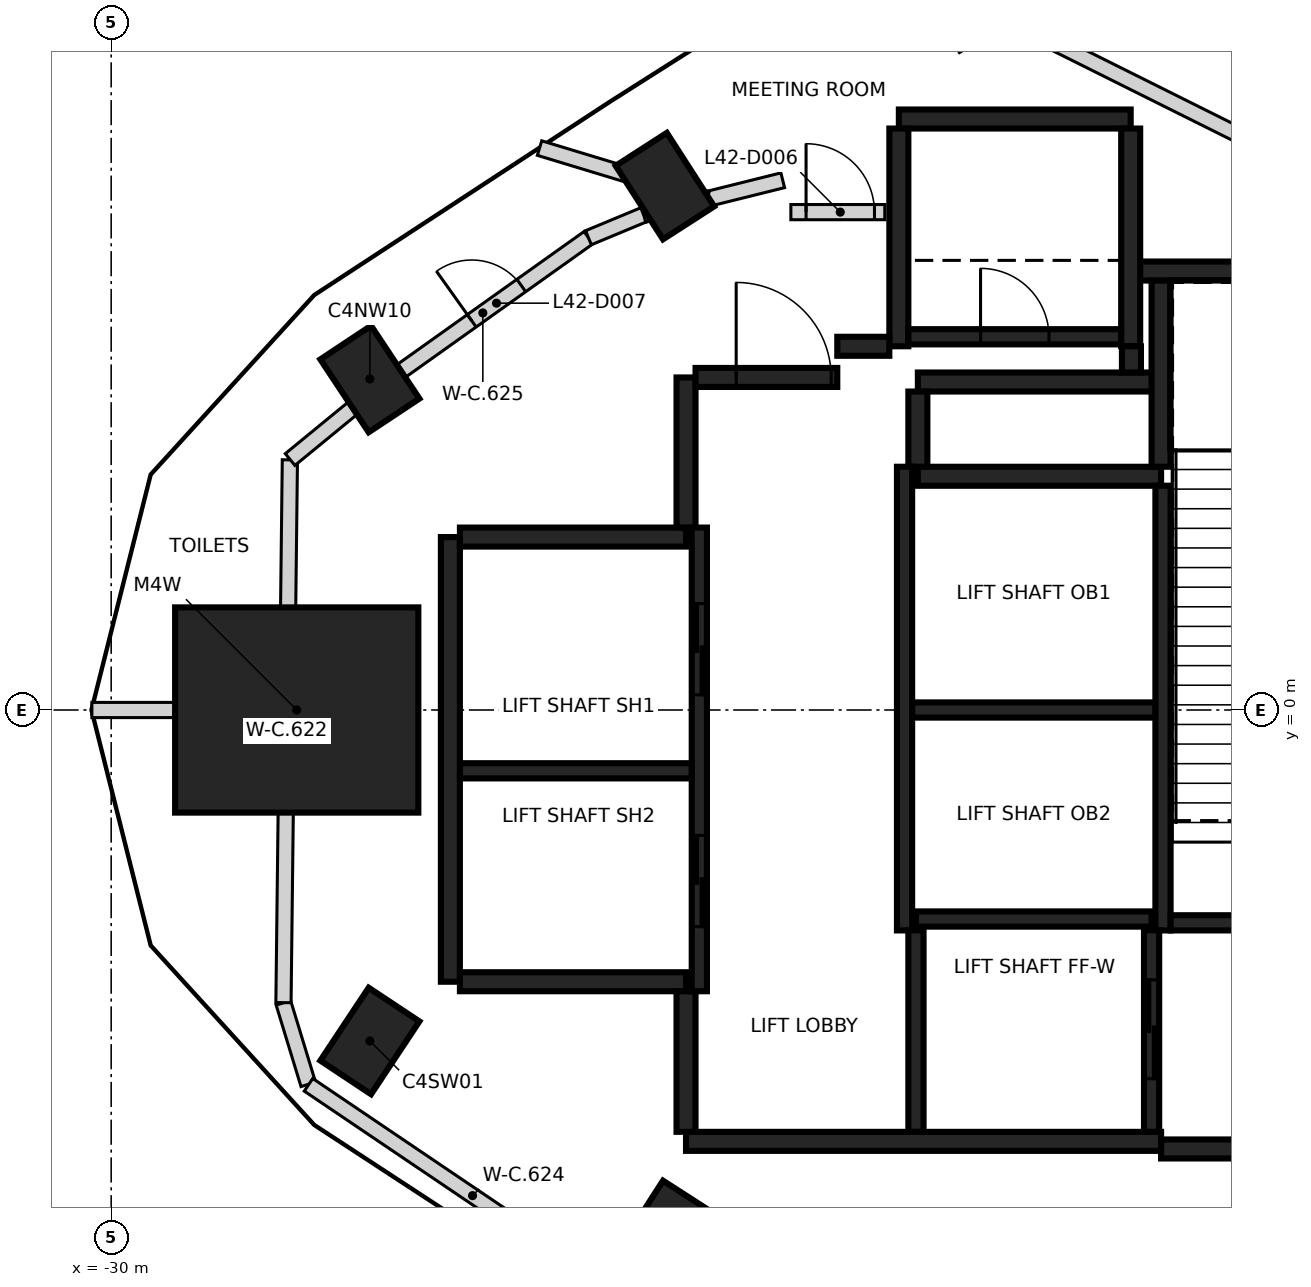
"""IFC4 building model, lengths in metres.
Left out: names, types, materials, properties, quantities, classifications, styles, units other than length and angle.
Written with IfcOpenShell. Run it as: python <this file> out.ifc"""

import sys

from ifc_helpers import new_model, si_unit, direction, frame, frame_2d, origin, origin_2d, place, context, subcontext, project, spatial, rectangle, extrude, element, fill, save


model = new_model("IFC4")
c1 = context("Model", 3, precision=1e-05, world=origin(), true_north=direction((0.0, 1.0)))
c2 = subcontext(c1, "Body", "Model", "MODEL_VIEW")
j1 = project(units=[si_unit("LENGTHUNIT", "METRE"), si_unit("PLANEANGLEUNIT", "RADIAN")], contexts=[c1])
p1 = place(None, origin())
s1 = spatial("IfcSite", under=j1, at=p1, CompositionType="ELEMENT")
p2 = place(p1, origin())
s2 = spatial("IfcBuilding", under=s1, at=p2, CompositionType="ELEMENT")
p3 = place(p2, frame((0.0, 0.0, 169.6)))
s3 = spatial("IfcBuildingStorey", under=s2, at=p3, CompositionType="ELEMENT", Elevation=169.6)
for number, where, z_axis, x_axis in (
    (1, (-22.715, 6.892, -0.35), (0.0, 0.0, 1.0), (-0.541, 0.841, 0.0)),
    (2, (-26.597, 4.354, -0.35), (0.0, 0.0, 1.0), (-0.553, 0.833, 0.0)),
    (3, (-26.597, -4.354, -0.35), (0.0, 0.0, 1.0), (0.553, 0.833, 0.0)),
    (4, (-22.715, -6.892, -0.35), (0.0, 0.0, 1.0), (0.541, 0.841, 0.0)),
):
    element("IfcColumn", number, at=place(p3, frame(where, z_axis=z_axis, x_axis=x_axis)), inside=s3, PredefinedType="COLUMN", context=c2, shape_type="SweptSolid", body=[
        extrude(rectangle(XDim=1.15, YDim=0.8, at=origin_2d()), origin(), (0.0, 0.0, 1.0), 6.0),
    ])
p4 = place(p3, frame((-27.559, 0.0, -0.35), z_axis=(0.0, 0.0, 1.0), x_axis=(1.0, 0.0, 0.0)))
e5 = element("IfcColumn", 5, at=p4, inside=s3, PredefinedType="COLUMN", context=c2, shape_type="SweptSolid", body=[
    extrude(rectangle(XDim=3.2, YDim=2.7, at=origin_2d()), origin(), (0.0, 0.0, 1.0), 6.0),
])
p5 = place(p3, frame((-16.187, -5.675, 0.0), z_axis=(0.0, 0.0, 1.0), x_axis=(-1.0, 0.0, 0.0)))
e6 = element("IfcWall", 6, at=p5, inside=s3, PredefinedType="SHEAR", context=c2, shape_type="SweptSolid", body=[
    extrude(rectangle(XDim=6.25, YDim=0.25, at=frame_2d((3.125, 0.0))), origin(), (0.0, 0.0, 1.0), 5.65),
])
p6 = place(p3, frame((-25.537, -3.575, 0.0), z_axis=(0.0, 0.0, 1.0), x_axis=(0.0, 1.0, 0.0)))
e7 = element("IfcWall", 7, at=p6, inside=s3, PredefinedType="SHEAR", context=c2, shape_type="SweptSolid", body=[
    extrude(rectangle(XDim=5.85, YDim=0.25, at=frame_2d((2.925, 0.0))), origin(), (0.0, 0.0, 1.0), 5.65),
])
p7 = place(p3, frame((-10.963, -5.775, 0.0), z_axis=(0.0, 0.0, 1.0), x_axis=(-1.0, 0.0, 0.0)))
e8 = element("IfcWall", 8, at=p7, inside=s3, PredefinedType="SHEAR", context=c2, shape_type="SweptSolid", body=[
    extrude(rectangle(XDim=5.225, YDim=0.25, at=frame_2d((2.612, 0.0))), origin(), (0.0, 0.0, 1.0), 5.65),
])
p8 = place(p3, frame((-16.472, 5.775, 0.0), z_axis=(0.0, 0.0, 1.0), x_axis=(1.0, 0.0, 0.0)))
e9 = element("IfcWall", 9, at=p8, inside=s3, PredefinedType="SHEAR", context=c2, shape_type="SweptSolid", body=[
    extrude(rectangle(XDim=5.51, YDim=0.25, at=frame_2d((2.755, 0.0))), origin(), (0.0, 0.0, 1.0), 5.65),
])
p9 = place(p3, frame((-19.387, 3.075, 0.0), z_axis=(0.0, 0.0, 1.0), x_axis=(1.0, 0.0, 0.0)))
e10 = element("IfcWall", 10, at=p9, inside=s3, PredefinedType="SHEAR", context=c2, shape_type="SweptSolid", body=[
    extrude(rectangle(XDim=3.2, YDim=0.25, at=frame_2d((1.6, 0.0))), origin(), (0.0, 0.0, 1.0), 5.65),
])
for number, where, z_axis, x_axis in (
    (11, (-22.437, -3.575, 0.0), (0.0, 0.0, 1.0), (-1.0, 0.0, 0.0)),
    (12, (-25.412, 2.275, 0.0), (0.0, 0.0, 1.0), (1.0, 0.0, 0.0)),
):
    element("IfcWall", number, at=place(p3, frame(where, z_axis=z_axis, x_axis=x_axis)), inside=s3, PredefinedType="SHEAR", context=c2, shape_type="SweptSolid", body=[
        extrude(rectangle(XDim=2.975, YDim=0.25, at=frame_2d((1.487, 0.0))), origin(), (0.0, 0.0, 1.0), 5.65),
    ])
p10 = place(p3, frame((-19.637, 7.775, 0.0), z_axis=(0.0, 0.0, 1.0), x_axis=(1.0, 0.0, 0.0)))
e13 = element("IfcWall", 13, at=p10, inside=s3, PredefinedType="SHEAR", context=c2, shape_type="SweptSolid", body=[
    extrude(rectangle(XDim=3.05, YDim=0.25, at=frame_2d((1.525, 0.0))), origin(), (0.0, 0.0, 1.0), 5.65),
])
for number, where, z_axis, x_axis in (
    (14, (-16.587, 7.65, 0.0), (0.0, 0.0, 1.0), (0.0, -1.0, 0.0)),
    (15, (-19.637, 4.785, 0.0), (0.0, 0.0, 1.0), (0.0, 1.0, 0.0)),
):
    element("IfcWall", number, at=place(p3, frame(where, z_axis=z_axis, x_axis=x_axis)), inside=s3, PredefinedType="SHEAR", context=c2, shape_type="SweptSolid", body=[
        extrude(rectangle(XDim=2.865, YDim=0.25, at=frame_2d((1.432, 0.0))), origin(), (0.0, 0.0, 1.0), 5.65),
    ])
p11 = place(p3, frame((-16.302, 4.315, 0.0), z_axis=(0.0, 0.0, 1.0), x_axis=(-1.0, 0.0, 0.0)))
e16 = element("IfcWall", 16, at=p11, inside=s3, PredefinedType="SHEAR", context=c2, shape_type="SweptSolid", body=[
    extrude(rectangle(XDim=3.085, YDim=0.25, at=frame_2d((1.542, 0.0))), origin(), (0.0, 0.0, 1.0), 5.65),
])
p12 = place(p3, frame((-16.187, 3.2, 0.0), z_axis=(0.0, 0.0, 1.0), x_axis=(0.0, 1.0, 0.0)))
e17 = element("IfcWall", 17, at=p12, inside=s3, PredefinedType="SHEAR", context=c2, shape_type="SweptSolid", body=[
    extrude(rectangle(XDim=2.449, YDim=0.25, at=frame_2d((1.225, 0.0))), origin(), (0.0, 0.0, 1.0), 5.65),
])
p13 = place(p3, frame((-22.437, 2.4, 0.0), z_axis=(0.0, 0.0, 1.0), x_axis=(0.0, 1.0, 0.0)))
e18 = element("IfcWall", 18, at=p13, inside=s3, PredefinedType="SHEAR", context=c2, shape_type="SweptSolid", body=[
    extrude(rectangle(XDim=1.975, YDim=0.25, at=frame_2d((0.987, 0.0))), origin(), (0.0, 0.0, 1.0), 5.65),
])
p14 = place(p3, frame((-22.437, -5.55, 0.0), z_axis=(0.0, 0.0, 1.0), x_axis=(0.0, 1.0, 0.0)))
e19 = element("IfcWall", 19, at=p14, inside=s3, PredefinedType="SHEAR", context=c2, shape_type="SweptSolid", body=[
    extrude(rectangle(XDim=1.849, YDim=0.25, at=frame_2d((0.925, 0.0))), origin(), (0.0, 0.0, 1.0), 5.65),
])
p15 = place(p3, frame((-22.312, 4.375, 0.0), z_axis=(0.0, 0.0, 1.0), x_axis=(1.0, 0.0, 0.0)))
e20 = element("IfcWall", 20, at=p15, inside=s3, PredefinedType="SHEAR", context=c2, shape_type="SweptSolid", body=[
    extrude(rectangle(XDim=1.865, YDim=0.25, at=frame_2d((0.932, 0.0))), origin(), (0.0, 0.0, 1.0), 5.65),
])
p16 = place(p15, frame((0.535, 0.0, 0.0)))
e21 = element("IfcOpeningElement", 21, at=p16, cuts=e20, PredefinedType="OPENING", context=c2, shape_type="SweptSolid", body=[
    extrude(rectangle(XDim=1.25, YDim=2.1, at=frame_2d((0.625, 1.05))), frame((0.0, 0.135, 0.0), z_axis=(0.0, -1.0, 0.0), x_axis=(1.0, 0.0, 0.0)), (0.0, 0.0, 1.0), 0.27),
])
p17 = place(p3, frame((-19.387, 4.19, 0.0), z_axis=(0.0, 0.0, 1.0), x_axis=(0.0, -1.0, 0.0)))
e22 = element("IfcWall", 22, at=p17, inside=s3, PredefinedType="SHEAR", context=c2, shape_type="SweptSolid", body=[
    extrude(rectangle(XDim=0.989, YDim=0.25, at=frame_2d((0.495, 0.0))), origin(), (0.0, 0.0, 1.0), 5.65),
])
p18 = place(p3, frame((-20.447, 4.785, 0.0), z_axis=(0.0, 0.0, 1.0), x_axis=(1.0, 0.0, 0.0)))
e23 = element("IfcWall", 23, at=p18, inside=s3, PredefinedType="SHEAR", context=c2, shape_type="SweptSolid", body=[
    extrude(rectangle(XDim=0.685, YDim=0.25, at=frame_2d((0.342, 0.0))), origin(), (0.0, 0.0, 1.0), 5.65),
])
p19 = place(p3, frame((-16.577, 4.785, 0.0), z_axis=(0.0, 0.0, 1.0), x_axis=(0.0, -1.0, 0.0)))
e24 = element("IfcWall", 24, at=p19, inside=s3, PredefinedType="SHEAR", context=c2, shape_type="SweptSolid", body=[
    extrude(rectangle(XDim=0.344, YDim=0.25, at=frame_2d((0.172, 0.0))), origin(), (0.0, 0.0, 1.0), 5.65),
])
p20 = place(p3, frame((-16.162, 2.951, 0.0), z_axis=(0.0, 0.0, 1.0), x_axis=(0.0, -1.0, 0.0)))
e25 = element("IfcWall", 25, at=p20, inside=s3, PredefinedType="SHEAR", context=c2, shape_type="SweptSolid", body=[
    extrude(rectangle(XDim=5.851, YDim=0.2, at=frame_2d((2.925, 0.0))), origin(), (0.0, 0.0, 1.0), 5.65),
])
p21 = place(p3, frame((-19.562, -2.9, 0.0), z_axis=(0.0, 0.0, 1.0), x_axis=(0.0, 1.0, 0.0)))
e26 = element("IfcWall", 26, at=p21, inside=s3, PredefinedType="SHEAR", context=c2, shape_type="SweptSolid", body=[
    extrude(rectangle(XDim=6.1, YDim=0.2, at=frame_2d((3.05, 0.0))), origin(), (0.0, 0.0, 1.0), 5.65),
])
p22 = place(p3, frame((-22.262, 2.4, 0.0), z_axis=(0.0, 0.0, 1.0), x_axis=(0.0, -1.0, 0.0)))
e27 = element("IfcWall", 27, at=p22, inside=s3, PredefinedType="SHEAR", context=c2, shape_type="SweptSolid", body=[
    extrude(rectangle(XDim=6.1, YDim=0.2, at=frame_2d((3.05, 0.0))), origin(), (0.0, 0.0, 1.0), 5.65),
])
p23 = place(p22, frame((1.0, 0.0, 0.0)))
e28 = element("IfcOpeningElement", 28, at=p23, cuts=e27, PredefinedType="OPENING", context=c2, shape_type="SweptSolid", body=[
    extrude(rectangle(XDim=1.2, YDim=2.1, at=frame_2d((0.6, 1.05))), frame((0.0, 0.11, 0.0), z_axis=(0.0, -1.0, 0.0), x_axis=(1.0, 0.0, 0.0)), (0.0, 0.0, 1.0), 0.22),
])
p24 = place(p22, frame((4.05, 0.0, 0.0)))
e29 = element("IfcOpeningElement", 29, at=p24, cuts=e27, PredefinedType="OPENING", context=c2, shape_type="SweptSolid", body=[
    extrude(rectangle(XDim=1.2, YDim=2.1, at=frame_2d((0.6, 1.05))), frame((0.0, 0.11, 0.0), z_axis=(0.0, -1.0, 0.0), x_axis=(1.0, 0.0, 0.0)), (0.0, 0.0, 1.0), 0.22),
])
p25 = place(p3, frame((-10.963, -2.8, 0.0), z_axis=(0.0, 0.0, 1.0), x_axis=(-1.0, 0.0, 0.0)))
e30 = element("IfcWall", 30, at=p25, inside=s3, PredefinedType="SHEAR", context=c2, shape_type="SweptSolid", body=[
    extrude(rectangle(XDim=5.098, YDim=0.2, at=frame_2d((2.549, 0.0))), origin(), (0.0, 0.0, 1.0), 5.65),
])
p26 = place(p25, frame((1.774, 0.0, 0.0)))
e31 = element("IfcOpeningElement", 31, at=p26, cuts=e30, PredefinedType="OPENING", context=c2, shape_type="SweptSolid", body=[
    extrude(rectangle(XDim=1.4, YDim=2.1, at=frame_2d((0.7, 1.05))), frame((0.0, 0.11, 0.0), z_axis=(0.0, -1.0, 0.0), x_axis=(1.0, 0.0, 0.0)), (0.0, 0.0, 1.0), 0.22),
])
p27 = place(p3, frame((-16.263, 0.0, 0.0), z_axis=(0.0, 0.0, 1.0), x_axis=(-1.0, 0.0, 0.0)))
e32 = element("IfcWall", 32, at=p27, inside=s3, PredefinedType="SHEAR", context=c2, shape_type="SweptSolid", body=[
    extrude(rectangle(XDim=3.198, YDim=0.2, at=frame_2d((1.599, 0.0))), origin(), (0.0, 0.0, 1.0), 5.65),
])
p28 = place(p3, frame((-22.363, -0.8, 0.0), z_axis=(0.0, 0.0, 1.0), x_axis=(-1.0, 0.0, 0.0)))
e33 = element("IfcWall", 33, at=p28, inside=s3, PredefinedType="SHEAR", context=c2, shape_type="SweptSolid", body=[
    extrude(rectangle(XDim=3.048, YDim=0.2, at=frame_2d((1.524, 0.0))), origin(), (0.0, 0.0, 1.0), 5.65),
])
p29 = place(p3, frame((-19.511, 4.91, 0.0), z_axis=(0.0, 0.0, 1.0), x_axis=(1.0, 0.0, 0.0)))
e34 = element("IfcWall", 34, at=p29, inside=s3, PredefinedType="SHEAR", context=c2, shape_type="SweptSolid", body=[
    extrude(rectangle(XDim=2.798, YDim=0.2, at=frame_2d((1.399, 0.0))), origin(), (0.0, 0.0, 1.0), 5.65),
])
p30 = place(p29, frame((0.949, 0.0, 0.0)))
e35 = element("IfcOpeningElement", 35, at=p30, cuts=e34, PredefinedType="OPENING", context=c2, shape_type="SweptSolid", body=[
    extrude(rectangle(XDim=0.9, YDim=2.1, at=frame_2d((0.45, 1.05))), frame((0.0, 0.11, 0.0), z_axis=(0.0, -1.0, 0.0), x_axis=(1.0, 0.0, 0.0)), (0.0, 0.0, 1.0), 0.22),
])
p31 = place(p3, frame((-19.412, -2.75, 0.0), z_axis=(0.0, 0.0, 1.0), x_axis=(1.0, 0.0, 0.0)))
e36 = element("IfcWall", 36, at=p31, inside=s3, PredefinedType="SHEAR", context=c2, shape_type="SweptSolid", body=[
    extrude(rectangle(XDim=3.1, YDim=0.2, at=frame_2d((1.55, 0.0))), origin(), (0.0, 0.0, 1.0), 5.65),
])
p32 = place(p3, frame((-16.312, -2.898, 0.0), z_axis=(0.0, 0.0, 1.0), x_axis=(0.0, -1.0, 0.0)))
e37 = element("IfcWall", 37, at=p32, inside=s3, PredefinedType="SHEAR", context=c2, shape_type="SweptSolid", body=[
    extrude(rectangle(XDim=2.651, YDim=0.2, at=frame_2d((1.325, 0.0))), origin(), (0.0, 0.0, 1.0), 5.65),
])
p33 = place(p32, frame((0.652, 0.0, 0.0)))
e38 = element("IfcOpeningElement", 38, at=p33, cuts=e37, PredefinedType="OPENING", context=c2, shape_type="SweptSolid", body=[
    extrude(rectangle(XDim=1.3, YDim=2.1, at=frame_2d((0.65, 1.05))), frame((0.0, 0.11, 0.0), z_axis=(0.0, -1.0, 0.0), x_axis=(1.0, 0.0, 0.0)), (0.0, 0.0, 1.0), 0.22),
])
p34 = place(p3, frame((-19.412, -5.549, 0.0), z_axis=(0.0, 0.0, 1.0), x_axis=(0.0, 1.0, 0.0)))
e39 = element("IfcWall", 39, at=p34, inside=s3, PredefinedType="SHEAR", context=c2, shape_type="SweptSolid", body=[
    extrude(rectangle(XDim=2.651, YDim=0.2, at=frame_2d((1.325, 0.0))), origin(), (0.0, 0.0, 1.0), 5.65),
])
p35 = place(p3, frame((-27.734, -3.853, 0.0), z_axis=(0.0, 0.0, 1.0), x_axis=(0.291681664309, -0.956515450323, 0.0)))
e40 = element("IfcWall", 40, at=p35, inside=s3, PredefinedType="PARTITIONING", context=c2, shape_type="SweptSolid", body=[
    extrude(rectangle(XDim=1.121, YDim=0.2, at=frame_2d((0.561, 0.0))), origin(), (0.0, 0.0, 1.0), 5.65),
])
p36 = place(p3, frame((-27.733, -3.85, 0.0), z_axis=(0.0, 0.0, 1.0), x_axis=(0.011828232316, 0.999930044013, 0.0)))
e41 = element("IfcWall", 41, at=p36, inside=s3, PredefinedType="PARTITIONING", context=c2, shape_type="SweptSolid", body=[
    extrude(rectangle(XDim=7.142, YDim=0.2, at=frame_2d((3.571, 0.0))), origin(), (0.0, 0.0, 1.0), 4.75),
])
p37 = place(p3, frame((-27.646, 3.295, 0.0), z_axis=(0.0, 0.0, 1.0), x_axis=(0.773112716348, 0.634268655871, 0.0)))
e42 = element("IfcWall", 42, at=p37, inside=s3, PredefinedType="PARTITIONING", context=c2, shape_type="SweptSolid", body=[
    extrude(rectangle(XDim=1.482, YDim=0.2, at=frame_2d((0.741, 0.0))), origin(), (0.0, 0.0, 1.0), 5.65),
])
p38 = place(p3, frame((-27.404, -4.931, 0.0), z_axis=(0.0, 0.0, 1.0), x_axis=(0.828616586727, -0.559816534412, 0.0)))
e43 = element("IfcWall", 43, at=p38, inside=s3, PredefinedType="PARTITIONING", context=c2, shape_type="SweptSolid", body=[
    extrude(rectangle(XDim=5.209, YDim=0.2, at=frame_2d((2.604, 0.0))), origin(), (0.0, 0.0, 1.0), 5.65),
])
p39 = place(p3, frame((-26.5, 4.235, 0.0), z_axis=(0.0, 0.0, 1.0), x_axis=(0.814738171434, 0.579829036879, 0.0)))
e44 = element("IfcWall", 44, at=p39, inside=s3, PredefinedType="PARTITIONING", context=c2, shape_type="SweptSolid", body=[
    extrude(rectangle(XDim=3.411, YDim=0.2, at=frame_2d((1.706, 0.0))), origin(), (0.0, 0.0, 1.0), 4.75),
])
p40 = place(p39, frame((1.527, 0.0, 0.0)))
e45 = element("IfcOpeningElement", 45, at=p40, cuts=e44, PredefinedType="OPENING", context=c2, shape_type="SweptSolid", body=[
    extrude(rectangle(XDim=0.8, YDim=2.1, at=frame_2d((0.4, 1.05))), frame((0.0, 0.11, 0.0), z_axis=(0.0, -1.0, 0.0), x_axis=(1.0, 0.0, 0.0)), (0.0, 0.0, 1.0), 0.22),
])
p41 = place(p3, frame((-23.721, 6.213, 0.0), z_axis=(0.0, 0.0, 1.0), x_axis=(0.923269753153, 0.384152265271, 0.0)))
e46 = element("IfcWall", 46, at=p41, inside=s3, PredefinedType="PARTITIONING", context=c2, shape_type="SweptSolid", body=[
    extrude(rectangle(XDim=0.786, YDim=0.2, at=frame_2d((0.393, 0.0))), origin(), (0.0, 0.0, 1.0), 4.75),
])
p42 = place(p3, frame((-22.992, 6.515, 0.0), z_axis=(0.0, 0.0, 1.0), x_axis=(0.97043928485, 0.241345384085, 0.0)))
e47 = element("IfcWall", 47, at=p42, inside=s3, PredefinedType="PARTITIONING", context=c2, shape_type="SweptSolid", body=[
    extrude(rectangle(XDim=1.883, YDim=0.2, at=frame_2d((0.941, 0.0))), origin(), (0.0, 0.0, 1.0), 5.65),
])
p43 = place(p3, frame((-21.058, 6.55, 0.0), z_axis=(0.0, 0.0, 1.0), x_axis=(1.0, 0.0, 0.0)))
e48 = element("IfcWall", 48, at=p43, inside=s3, PredefinedType="PARTITIONING", context=c2, shape_type="SweptSolid", body=[
    extrude(rectangle(XDim=1.236, YDim=0.2, at=frame_2d((0.618, 0.0))), origin(), (0.0, 0.0, 1.0), 5.65),
])
p44 = place(p43, frame((0.2, 0.0, 0.0)))
e49 = element("IfcOpeningElement", 49, at=p44, cuts=e48, PredefinedType="OPENING", context=c2, shape_type="SweptSolid", body=[
    extrude(rectangle(XDim=0.9, YDim=2.1, at=frame_2d((0.45, 1.05))), frame((0.0, 0.11, 0.0), z_axis=(0.0, -1.0, 0.0), x_axis=(1.0, 0.0, 0.0)), (0.0, 0.0, 1.0), 0.22),
])
p45 = place(p3, frame((-30.254, 0.0, 0.0), z_axis=(0.0, 0.0, 1.0), x_axis=(1.0, 0.0, 0.0)))
e50 = element("IfcWall", 50, at=p45, inside=s3, PredefinedType="PARTITIONING", context=c2, shape_type="SweptSolid", body=[
    extrude(rectangle(XDim=2.564, YDim=0.2, at=frame_2d((1.282, 0.0))), origin(), (0.0, 0.0, 1.0), 5.65),
])
p46 = place(p3, frame((-24.364, 7.393, 0.0), z_axis=(0.0, 0.0, 1.0), x_axis=(0.956967335925, -0.290195654642, 0.0)))
e51 = element("IfcWall", 51, at=p46, inside=s3, PredefinedType="PARTITIONING", context=c2, shape_type="SweptSolid", body=[
    extrude(rectangle(XDim=2.303, YDim=0.2, at=frame_2d((1.152, 0.0))), origin(), (0.0, 0.0, 1.0), 5.65),
])
p47 = place(p3, frame((-20.179, 10.065, 0.0), z_axis=(0.0, 0.0, 1.0), x_axis=(0.894867434309, -0.446332023289, 0.0)))
e52 = element("IfcWall", 52, at=p47, inside=s3, PredefinedType="PARTITIONING", context=c2, shape_type="SweptSolid", body=[
    extrude(rectangle(XDim=9.197, YDim=0.2, at=frame_2d((4.598, 0.0))), origin(), (0.0, 0.0, 1.0), 5.65),
])
p48 = place(p33, origin())
e53 = element("IfcDoor", 53, at=p48, inside=s3, OperationType="SLIDING_TO_LEFT", PredefinedType="DOOR", context=c2, shape_type="SweptSolid", body=[
    extrude(rectangle(XDim=1.3, YDim=2.1, at=frame_2d((0.65, 1.05))), frame((0.0, 0.025, 0.0), z_axis=(0.0, -1.0, 0.0), x_axis=(1.0, 0.0, 0.0)), (0.0, 0.0, 1.0), 0.05),
])
fill(e38, e53)
p49 = place(p23, origin())
e54 = element("IfcDoor", 54, at=p49, inside=s3, OperationType="DOUBLE_DOOR_SLIDING", PredefinedType="DOOR", context=c2, shape_type="SweptSolid", body=[
    extrude(rectangle(XDim=1.2, YDim=2.1, at=frame_2d((0.6, 1.05))), frame((0.0, 0.025, 0.0), z_axis=(0.0, -1.0, 0.0), x_axis=(1.0, 0.0, 0.0)), (0.0, 0.0, 1.0), 0.05),
])
fill(e28, e54)
p50 = place(p24, origin())
e55 = element("IfcDoor", 55, at=p50, inside=s3, OperationType="DOUBLE_DOOR_SLIDING", PredefinedType="DOOR", context=c2, shape_type="SweptSolid", body=[
    extrude(rectangle(XDim=1.2, YDim=2.1, at=frame_2d((0.6, 1.05))), frame((0.0, 0.025, 0.0), z_axis=(0.0, -1.0, 0.0), x_axis=(1.0, 0.0, 0.0)), (0.0, 0.0, 1.0), 0.05),
])
fill(e29, e55)
p51 = place(p16, origin())
e56 = element("IfcDoor", 56, at=p51, inside=s3, OperationType="SINGLE_SWING_LEFT", PredefinedType="DOOR", context=c2, shape_type="SweptSolid", body=[
    extrude(rectangle(XDim=1.25, YDim=2.1, at=frame_2d((0.625, 1.05))), frame((0.0, 0.025, 0.0), z_axis=(0.0, -1.0, 0.0), x_axis=(1.0, 0.0, 0.0)), (0.0, 0.0, 1.0), 0.05),
])
fill(e21, e56)
p52 = place(p30, origin())
e57 = element("IfcDoor", 57, at=p52, inside=s3, OperationType="SINGLE_SWING_RIGHT", PredefinedType="DOOR", context=c2, shape_type="SweptSolid", body=[
    extrude(rectangle(XDim=0.9, YDim=2.1, at=frame_2d((0.45, 1.05))), frame((0.0, 0.025, 0.0), z_axis=(0.0, -1.0, 0.0), x_axis=(1.0, 0.0, 0.0)), (0.0, 0.0, 1.0), 0.05),
])
fill(e35, e57)
p53 = place(p44, origin())
e58 = element("IfcDoor", 58, at=p53, inside=s3, OperationType="SINGLE_SWING_LEFT", PredefinedType="DOOR", context=c2, shape_type="SweptSolid", body=[
    extrude(rectangle(XDim=0.9, YDim=2.1, at=frame_2d((0.45, 1.05))), frame((0.0, 0.025, 0.0), z_axis=(0.0, -1.0, 0.0), x_axis=(1.0, 0.0, 0.0)), (0.0, 0.0, 1.0), 0.05),
])
fill(e49, e58)
p54 = place(p40, origin())
e59 = element("IfcDoor", 59, at=p54, inside=s3, OperationType="SINGLE_SWING_LEFT", PredefinedType="DOOR", context=c2, shape_type="SweptSolid", body=[
    extrude(rectangle(XDim=0.8, YDim=2.1, at=frame_2d((0.4, 1.05))), frame((0.0, 0.025, 0.0), z_axis=(0.0, -1.0, 0.0), x_axis=(1.0, 0.0, 0.0)), (0.0, 0.0, 1.0), 0.05),
])
fill(e45, e59)
save(model, sys.argv[1])
